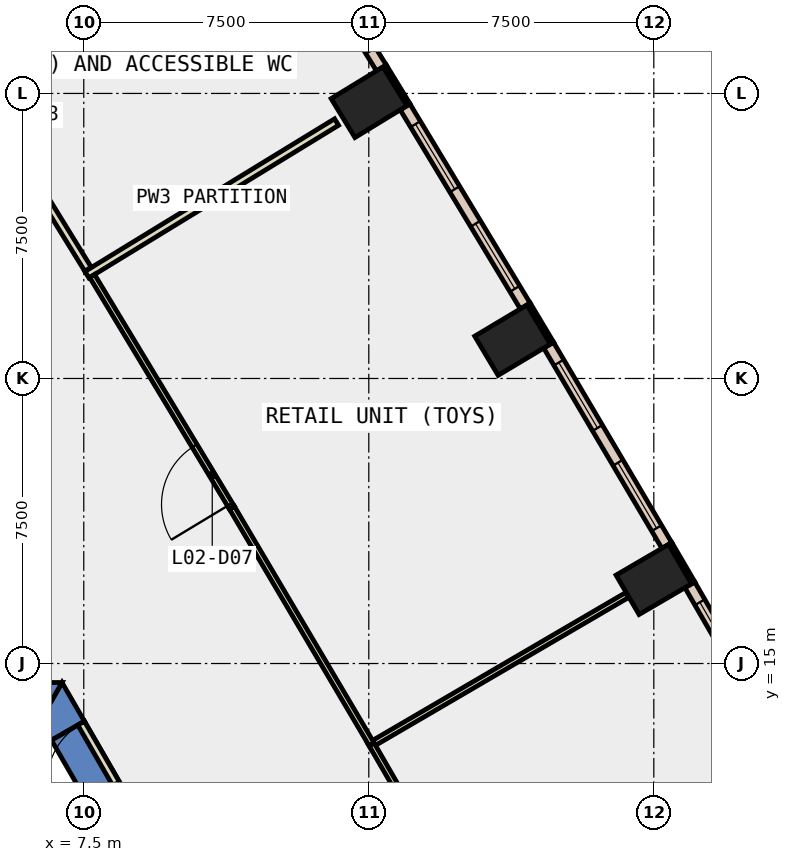
"""IFC4 building model, lengths in metres.
Left out: names, types, materials, properties, quantities, classifications, styles, units other than length and angle.
Written with IfcOpenShell. Run it as: python <this file> out.ifc"""

import sys

from ifc_helpers import new_model, si_unit, direction, frame, frame_2d, origin, origin_2d, place, context, subcontext, project, spatial, polyline, rectangle, outline, extrude, element, fill, save


model = new_model("IFC4")
c1 = context("Model", 3, precision=1e-05, world=origin(), true_north=direction((0.0, 1.0)))
c2 = subcontext(c1, "Body", "Model", "MODEL_VIEW")
j1 = project(units=[si_unit("LENGTHUNIT", "METRE"), si_unit("PLANEANGLEUNIT", "RADIAN")], contexts=[c1])
p1 = place(None, origin())
s1 = spatial("IfcSite", under=j1, at=p1, CompositionType="ELEMENT")
p2 = place(p1, origin())
s2 = spatial("IfcBuilding", under=s1, at=p2, CompositionType="ELEMENT")
p3 = place(p2, frame((0.0, 0.0, 15.0)))
s3 = spatial("IfcBuildingStorey", under=s2, at=p3, CompositionType="ELEMENT", Elevation=15.0)
for number, where, z_axis, x_axis in (
    (1, (22.5, 17.211, -0.45), (0.0, 0.0, 1.0), (-0.504, 0.864, 0.0)),
    (2, (18.782, 23.508, -0.45), (0.0, 0.0, 1.0), (-0.513, 0.858, 0.0)),
    (3, (15.005, 29.769, -0.45), (0.0, 0.0, 1.0), (-0.522, 0.853, 0.0)),
):
    element("IfcColumn", number, at=place(p3, frame(where, z_axis=z_axis, x_axis=x_axis)), inside=s3, PredefinedType="COLUMN", context=c2, shape_type="SweptSolid", body=[
        extrude(rectangle(XDim=1.2, YDim=1.6, at=origin_2d()), origin(), (0.0, 0.0, 1.0), 5.0),
    ])
p4 = place(p3, frame((0.0, 0.0, -0.45)))
e4 = element("IfcWall", 4, at=p4, inside=s3, PredefinedType="SHEAR", context=c2, shape_type="SweptSolid", body=[
    extrude(outline(polyline([(6.651, 12.98), (7.517, 13.48), (6.928, 14.5), (6.351, 13.5), (6.651, 12.98)])), origin(), (0.0, 0.0, 1.0), 5.0),
])
p5 = place(p3, frame((0.0, 0.0, 3.6)))
e5 = element("IfcWall", 5, at=p5, inside=s3, PredefinedType="SHEAR", context=c2, shape_type="SweptSolid", body=[
    extrude(outline(polyline([(7.517, 13.48), (6.651, 12.98), (7.651, 11.248), (8.517, 11.748), (7.517, 13.48)])), origin(), (0.0, 0.0, 1.0), 0.95),
])
p6 = place(p3, frame((0.0, 0.0, -0.45)))
e6 = element("IfcWall", 6, at=p6, inside=s3, PredefinedType="SHEAR", context=c2, shape_type="SweptSolid", body=[
    extrude(outline(polyline([(4.55, 14.5), (4.55, 13.5), (6.351, 13.5), (6.928, 14.5), (4.55, 14.5)])), origin(), (0.0, 0.0, 1.0), 5.0),
])
p7 = place(p3, frame((23.536, 17.122, 0.0), z_axis=(0.0, 0.0, 1.0), x_axis=(-0.504313844903, 0.863520437418, 0.0)))
e7 = element("IfcWall", 7, at=p7, inside=s3, PredefinedType="STANDARD", context=c2, shape_type="SweptSolid", body=[
    extrude(rectangle(XDim=1.2, YDim=0.1, at=frame_2d((0.6, 0.0))), origin(), (0.0, 0.0, 1.0), 4.55),
])
p8 = place(p3, frame((19.82, 23.429, 0.0), z_axis=(0.0, 0.0, 1.0), x_axis=(-0.513238760752, 0.858245870635, 0.0)))
e8 = element("IfcWall", 8, at=p8, inside=s3, PredefinedType="STANDARD", context=c2, shape_type="SweptSolid", body=[
    extrude(rectangle(XDim=1.2, YDim=0.1, at=frame_2d((0.6, 0.0))), origin(), (0.0, 0.0, 1.0), 4.55),
])
p9 = place(p3, frame((16.043, 29.7, 0.0), z_axis=(0.0, 0.0, 1.0), x_axis=(-0.521507599072, 0.853246637327, 0.0)))
e9 = element("IfcWall", 9, at=p9, inside=s3, PredefinedType="STANDARD", context=c2, shape_type="SweptSolid", body=[
    extrude(rectangle(XDim=1.2, YDim=0.1, at=frame_2d((0.6, 0.0))), origin(), (0.0, 0.0, 1.0), 4.55),
])
p10 = place(p3, frame((26.507, 11.77, 0.0), z_axis=(0.0, 0.0, 1.0), x_axis=(-0.499939977436, 0.866060055055, 0.0)))
e10 = element("IfcWall", 10, at=p10, inside=s3, PredefinedType="STANDARD", context=c2, shape_type="SweptSolid", body=[
    extrude(rectangle(XDim=6.121, YDim=0.3, at=frame_2d((3.061, 0.0))), origin(), (0.0, 0.0, 1.0), 4.55),
])
p11 = place(p10, frame((0.53, 0.0, 1.0)))
e11 = element("IfcOpeningElement", 11, at=p11, cuts=e10, PredefinedType="OPENING", context=c2, shape_type="SweptSolid", body=[
    extrude(rectangle(XDim=2.0, YDim=3.2, at=frame_2d((1.0, 1.6))), frame((0.0, 0.16, 0.0), z_axis=(0.0, -1.0, 0.0), x_axis=(1.0, 0.0, 0.0)), (0.0, 0.0, 1.0), 0.32),
])
p12 = place(p10, frame((3.591, 0.0, 1.0)))
e12 = element("IfcOpeningElement", 12, at=p12, cuts=e10, PredefinedType="OPENING", context=c2, shape_type="SweptSolid", body=[
    extrude(rectangle(XDim=2.0, YDim=3.2, at=frame_2d((1.0, 1.6))), frame((0.0, 0.16, 0.0), z_axis=(0.0, -1.0, 0.0), x_axis=(1.0, 0.0, 0.0)), (0.0, 0.0, 1.0), 0.32),
])
p13 = place(p3, frame((22.843, 18.105, 0.0), z_axis=(0.0, 0.0, 1.0), x_axis=(-0.50834231483, 0.861155091115, 0.0)))
e13 = element("IfcWall", 13, at=p13, inside=s3, PredefinedType="STANDARD", context=c2, shape_type="SweptSolid", body=[
    extrude(rectangle(XDim=6.122, YDim=0.3, at=frame_2d((3.061, 0.0))), origin(), (0.0, 0.0, 1.0), 4.55),
])
p14 = place(p13, frame((0.53, 0.0, 1.0)))
e14 = element("IfcOpeningElement", 14, at=p14, cuts=e13, PredefinedType="OPENING", context=c2, shape_type="SweptSolid", body=[
    extrude(rectangle(XDim=2.0, YDim=3.2, at=frame_2d((1.0, 1.6))), frame((0.0, 0.16, 0.0), z_axis=(0.0, -1.0, 0.0), x_axis=(1.0, 0.0, 0.0)), (0.0, 0.0, 1.0), 0.32),
])
p15 = place(p13, frame((3.591, 0.0, 1.0)))
e15 = element("IfcOpeningElement", 15, at=p15, cuts=e13, PredefinedType="OPENING", context=c2, shape_type="SweptSolid", body=[
    extrude(rectangle(XDim=2.0, YDim=3.2, at=frame_2d((1.0, 1.6))), frame((0.0, 0.16, 0.0), z_axis=(0.0, -1.0, 0.0), x_axis=(1.0, 0.0, 0.0)), (0.0, 0.0, 1.0), 0.32),
])
p16 = place(p3, frame((19.117, 24.406, 0.0), z_axis=(0.0, 0.0, 1.0), x_axis=(-0.516687651362, 0.85617397235, 0.0)))
e16 = element("IfcWall", 16, at=p16, inside=s3, PredefinedType="STANDARD", context=c2, shape_type="SweptSolid", body=[
    extrude(rectangle(XDim=6.121, YDim=0.3, at=frame_2d((3.061, 0.0))), origin(), (0.0, 0.0, 1.0), 4.55),
])
p17 = place(p16, frame((0.53, 0.0, 1.0)))
e17 = element("IfcOpeningElement", 17, at=p17, cuts=e16, PredefinedType="OPENING", context=c2, shape_type="SweptSolid", body=[
    extrude(rectangle(XDim=2.0, YDim=3.2, at=frame_2d((1.0, 1.6))), frame((0.0, 0.16, 0.0), z_axis=(0.0, -1.0, 0.0), x_axis=(1.0, 0.0, 0.0)), (0.0, 0.0, 1.0), 0.32),
])
p18 = place(p16, frame((3.591, 0.0, 1.0)))
e18 = element("IfcOpeningElement", 18, at=p18, cuts=e16, PredefinedType="OPENING", context=c2, shape_type="SweptSolid", body=[
    extrude(rectangle(XDim=2.0, YDim=3.2, at=frame_2d((1.0, 1.6))), frame((0.0, 0.16, 0.0), z_axis=(0.0, -1.0, 0.0), x_axis=(1.0, 0.0, 0.0)), (0.0, 0.0, 1.0), 0.32),
])
p19 = place(p3, frame((15.331, 30.67, 0.0), z_axis=(0.0, 0.0, 1.0), x_axis=(-0.524953701886, 0.85113078365, 0.0)))
e19 = element("IfcWall", 19, at=p19, inside=s3, PredefinedType="STANDARD", context=c2, shape_type="SweptSolid", body=[
    extrude(rectangle(XDim=6.123, YDim=0.3, at=frame_2d((3.061, 0.0))), origin(), (0.0, 0.0, 1.0), 4.55),
])
p20 = place(p19, frame((0.531, 0.0, 1.0)))
e20 = element("IfcOpeningElement", 20, at=p20, cuts=e19, PredefinedType="OPENING", context=c2, shape_type="SweptSolid", body=[
    extrude(rectangle(XDim=2.0, YDim=3.2, at=frame_2d((1.0, 1.6))), frame((0.0, 0.16, 0.0), z_axis=(0.0, -1.0, 0.0), x_axis=(1.0, 0.0, 0.0)), (0.0, 0.0, 1.0), 0.32),
])
p21 = place(p19, frame((3.592, 0.0, 1.0)))
e21 = element("IfcOpeningElement", 21, at=p21, cuts=e19, PredefinedType="OPENING", context=c2, shape_type="SweptSolid", body=[
    extrude(rectangle(XDim=2.0, YDim=3.2, at=frame_2d((1.0, 1.6))), frame((0.0, 0.16, 0.0), z_axis=(0.0, -1.0, 0.0), x_axis=(1.0, 0.0, 0.0)), (0.0, 0.0, 1.0), 0.32),
])
p22 = place(p3, frame((15.009, 12.836, 0.0), z_axis=(0.0, 0.0, 1.0), x_axis=(0.863477776245, 0.50438688517, 0.0)))
e22 = element("IfcWall", 22, at=p22, inside=s3, PredefinedType="PARTITIONING", context=c2, shape_type="SweptSolid", body=[
    extrude(rectangle(XDim=7.855, YDim=0.15, at=frame_2d((3.928, 0.0))), origin(), (0.0, 0.0, 1.0), 4.55),
])
p23 = place(p3, frame((15.798, 11.621, 0.0), z_axis=(0.0, 0.0, 1.0), x_axis=(-0.500384402157, 0.865803355317, 0.0)))
e23 = element("IfcWall", 23, at=p23, inside=s3, PredefinedType="PARTITIONING", context=c2, shape_type="SweptSolid", body=[
    extrude(rectangle(XDim=1.447, YDim=0.15, at=frame_2d((0.724, 0.0))), origin(), (0.0, 0.0, 1.0), 4.55),
])
p24 = place(p3, frame((7.583, 25.231, 0.0), z_axis=(0.0, 0.0, 1.0), x_axis=(0.853185410435, 0.521607760124, 0.0)))
e24 = element("IfcWall", 24, at=p24, inside=s3, PredefinedType="PARTITIONING", context=c2, shape_type="SweptSolid", body=[
    extrude(rectangle(XDim=7.699, YDim=0.2, at=frame_2d((3.85, 0.0))), origin(), (0.0, 0.0, 1.0), 4.55),
])
p25 = place(p3, frame((15.073, 12.875, 0.0), z_axis=(0.0, 0.0, 1.0), x_axis=(-0.508419849244, 0.861109317621, 0.0)))
e25 = element("IfcWall", 25, at=p25, inside=s3, PredefinedType="PARTITIONING", context=c2, shape_type="SweptSolid", body=[
    extrude(rectangle(XDim=7.23, YDim=0.15, at=frame_2d((3.615, 0.0))), origin(), (0.0, 0.0, 1.0), 4.55),
])
p26 = place(p3, frame((11.397, 19.101, 0.0), z_axis=(0.0, 0.0, 1.0), x_axis=(-0.516501552057, 0.856286252793, 0.0)))
e26 = element("IfcWall", 26, at=p26, inside=s3, PredefinedType="PARTITIONING", context=c2, shape_type="SweptSolid", body=[
    extrude(rectangle(XDim=7.119, YDim=0.15, at=frame_2d((3.56, 0.0))), origin(), (0.0, 0.0, 1.0), 4.55),
])
p27 = place(p26, frame((0.1, 0.0, 0.0)))
e27 = element("IfcOpeningElement", 27, at=p27, cuts=e26, PredefinedType="OPENING", context=c2, shape_type="SweptSolid", body=[
    extrude(rectangle(XDim=1.8, YDim=2.1, at=frame_2d((0.9, 1.05))), frame((0.0, 0.085, 0.0), z_axis=(0.0, -1.0, 0.0), x_axis=(1.0, 0.0, 0.0)), (0.0, 0.0, 1.0), 0.17),
])
p28 = place(p3, frame((7.611, 25.376, 0.0), z_axis=(0.0, 0.0, 1.0), x_axis=(-0.525006538042, 0.85109819352, 0.0)))
e28 = element("IfcWall", 28, at=p28, inside=s3, PredefinedType="PARTITIONING", context=c2, shape_type="SweptSolid", body=[
    extrude(rectangle(XDim=7.13, YDim=0.2, at=frame_2d((3.565, 0.0))), origin(), (0.0, 0.0, 1.0), 4.55),
])
p29 = place(p28, frame((2.97, 0.0, 0.0)))
e29 = element("IfcOpeningElement", 29, at=p29, cuts=e28, PredefinedType="OPENING", context=c2, shape_type="SweptSolid", body=[
    extrude(rectangle(XDim=1.0, YDim=2.1, at=frame_2d((0.5, 1.05))), frame((0.0, 0.11, 0.0), z_axis=(0.0, -1.0, 0.0), x_axis=(1.0, 0.0, 0.0)), (0.0, 0.0, 1.0), 0.22),
])
p30 = place(p3, frame((8.43, 11.698, 0.0), z_axis=(0.0, 0.0, 1.0), x_axis=(-0.50002537861, 0.866010750942, 0.0)))
e30 = element("IfcWall", 30, at=p30, inside=s3, PredefinedType="PARTITIONING", context=c2, shape_type="SweptSolid", body=[
    extrude(rectangle(XDim=2.0, YDim=0.2, at=frame_2d((1.0, 0.0))), origin(), (0.0, 0.0, 1.0), 2.4),
])
p31 = place(p30, frame((0.19, 0.0, 0.0)))
e31 = element("IfcOpeningElement", 31, at=p31, cuts=e30, PredefinedType="OPENING", context=c2, shape_type="SweptSolid", body=[
    extrude(rectangle(XDim=1.8, YDim=2.1, at=frame_2d((0.9, 1.05))), frame((0.0, 0.11, 0.0), z_axis=(0.0, -1.0, 0.0), x_axis=(1.0, 0.0, 0.0)), (0.0, 0.0, 1.0), 0.22),
])
p32 = place(p12, origin())
e32 = element("IfcWindow", 32, at=p32, inside=s3, PartitioningType="SINGLE_PANEL", PredefinedType="WINDOW", context=c2, shape_type="SweptSolid", body=[
    extrude(rectangle(XDim=2.0, YDim=3.2, at=frame_2d((1.0, 1.6))), frame((0.0, 0.03, 0.0), z_axis=(0.0, -1.0, 0.0), x_axis=(1.0, 0.0, 0.0)), (0.0, 0.0, 1.0), 0.06),
])
fill(e12, e32)
p33 = place(p14, origin())
e33 = element("IfcWindow", 33, at=p33, inside=s3, PartitioningType="SINGLE_PANEL", PredefinedType="WINDOW", context=c2, shape_type="SweptSolid", body=[
    extrude(rectangle(XDim=2.0, YDim=3.2, at=frame_2d((1.0, 1.6))), frame((0.0, 0.03, 0.0), z_axis=(0.0, -1.0, 0.0), x_axis=(1.0, 0.0, 0.0)), (0.0, 0.0, 1.0), 0.06),
])
fill(e14, e33)
p34 = place(p15, origin())
e34 = element("IfcWindow", 34, at=p34, inside=s3, PartitioningType="SINGLE_PANEL", PredefinedType="WINDOW", context=c2, shape_type="SweptSolid", body=[
    extrude(rectangle(XDim=2.0, YDim=3.2, at=frame_2d((1.0, 1.6))), frame((0.0, 0.03, 0.0), z_axis=(0.0, -1.0, 0.0), x_axis=(1.0, 0.0, 0.0)), (0.0, 0.0, 1.0), 0.06),
])
fill(e15, e34)
p35 = place(p17, origin())
e35 = element("IfcWindow", 35, at=p35, inside=s3, PartitioningType="SINGLE_PANEL", PredefinedType="WINDOW", context=c2, shape_type="SweptSolid", body=[
    extrude(rectangle(XDim=2.0, YDim=3.2, at=frame_2d((1.0, 1.6))), frame((0.0, 0.03, 0.0), z_axis=(0.0, -1.0, 0.0), x_axis=(1.0, 0.0, 0.0)), (0.0, 0.0, 1.0), 0.06),
])
fill(e17, e35)
p36 = place(p18, origin())
e36 = element("IfcWindow", 36, at=p36, inside=s3, PartitioningType="SINGLE_PANEL", PredefinedType="WINDOW", context=c2, shape_type="SweptSolid", body=[
    extrude(rectangle(XDim=2.0, YDim=3.2, at=frame_2d((1.0, 1.6))), frame((0.0, 0.03, 0.0), z_axis=(0.0, -1.0, 0.0), x_axis=(1.0, 0.0, 0.0)), (0.0, 0.0, 1.0), 0.06),
])
fill(e18, e36)
p37 = place(p27, origin())
e37 = element("IfcDoor", 37, at=p37, inside=s3, OperationType="DOUBLE_DOOR_SINGLE_SWING", PredefinedType="DOOR", context=c2, shape_type="SweptSolid", body=[
    extrude(rectangle(XDim=1.8, YDim=2.1, at=frame_2d((0.9, 1.05))), frame((0.0, 0.025, 0.0), z_axis=(0.0, -1.0, 0.0), x_axis=(1.0, 0.0, 0.0)), (0.0, 0.0, 1.0), 0.05),
])
fill(e27, e37)
p38 = place(p31, origin())
e38 = element("IfcDoor", 38, at=p38, inside=s3, OperationType="DOUBLE_DOOR_SINGLE_SWING", PredefinedType="DOOR", context=c2, shape_type="SweptSolid", body=[
    extrude(rectangle(XDim=1.8, YDim=2.1, at=frame_2d((0.9, 1.05))), frame((0.0, 0.025, 0.0), z_axis=(0.0, -1.0, 0.0), x_axis=(1.0, 0.0, 0.0)), (0.0, 0.0, 1.0), 0.05),
])
fill(e31, e38)
save(model, sys.argv[1])
